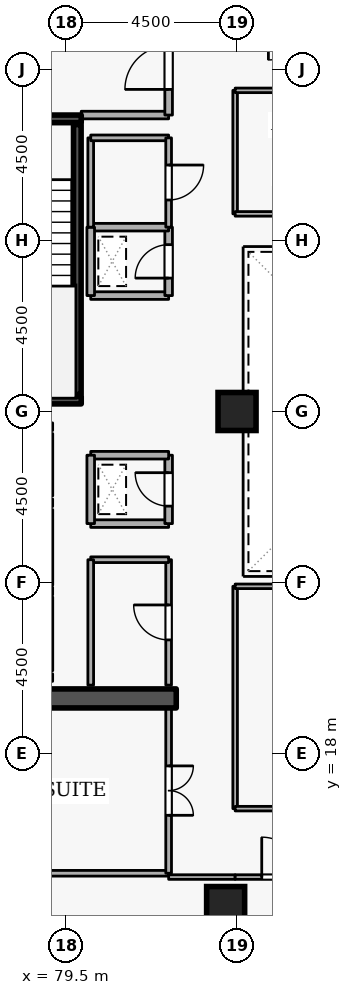
"""IFC4 building model, lengths in metres.
Left out: names, types, materials, properties, quantities, classifications, styles, units other than length and angle.
Written with IfcOpenShell. Run it as: python <this file> out.ifc"""

import sys

from ifc_helpers import new_model, si_unit, direction, frame, frame_2d, origin, origin_2d, place, context, subcontext, project, spatial, rectangle, extrude, element, fill, save


model = new_model("IFC4")
c1 = context("Model", 3, precision=1e-05, world=origin(), true_north=direction((0.0, 1.0)))
c2 = subcontext(c1, "Body", "Model", "MODEL_VIEW")
j1 = project(units=[si_unit("LENGTHUNIT", "METRE"), si_unit("PLANEANGLEUNIT", "RADIAN")], contexts=[c1])
p1 = place(None, origin())
s1 = spatial("IfcSite", under=j1, at=p1, CompositionType="ELEMENT")
p2 = place(p1, origin())
s2 = spatial("IfcBuilding", under=s1, at=p2, CompositionType="ELEMENT")
p3 = place(p2, frame((0.0, 0.0, 233.1)))
s3 = spatial("IfcBuildingStorey", under=s2, at=p3, CompositionType="ELEMENT", Elevation=233.1)
p4 = place(p3, frame((76.6, 19.45, 0.0), z_axis=(0.0, 0.0, 1.0), x_axis=(1.0, 0.0, 0.0)))
e1 = element("IfcWall", 1, at=p4, inside=s3, PredefinedType="SHEAR", context=c2, shape_type="SweptSolid", body=[
    extrude(rectangle(XDim=5.8, YDim=0.5, at=frame_2d((2.9, 0.0))), origin(), (0.0, 0.0, 1.0), 3.6),
])
for number, where, z_axis, x_axis in (
    (2, (83.7, 14.0, 0.0), (0.0, 0.0, 1.0), (1.0, 0.0, 0.0)),
    (3, (84.0, 27.0, 0.0), (0.0, 0.0, 1.0), (1.0, 0.0, 0.0)),
):
    element("IfcColumn", number, at=place(p3, frame(where, z_axis=z_axis, x_axis=x_axis)), inside=s3, PredefinedType="COLUMN", context=c2, shape_type="SweptSolid", body=[
        extrude(rectangle(XDim=1.0, YDim=1.0, at=origin_2d()), origin(), (0.0, 0.0, 1.0), 3.6),
    ])
p5 = place(p3, frame((79.05, 24.78, 0.0), z_axis=(0.0, 0.0, 1.0), x_axis=(0.0, 1.0, 0.0)))
e4 = element("IfcWall", 4, at=p5, inside=s3, PredefinedType="STANDARD", context=c2, shape_type="SweptSolid", body=[
    extrude(rectangle(XDim=1.64, YDim=0.2, at=frame_2d((0.82, 0.0))), origin(), (0.0, 0.0, 1.0), 3.34),
])
p6 = place(p5, frame((0.31, 0.0, 0.0)))
e5 = element("IfcOpeningElement", 5, at=p6, cuts=e4, PredefinedType="OPENING", context=c2, shape_type="SweptSolid", body=[
    extrude(rectangle(XDim=1.02, YDim=2.06, at=frame_2d((0.51, 1.03))), frame((0.0, 0.11, 0.0), z_axis=(0.0, -1.0, 0.0), x_axis=(1.0, 0.0, 0.0)), (0.0, 0.0, 1.0), 0.22),
])
p7 = place(p3, frame((79.05, 22.43, 0.0), z_axis=(0.0, 0.0, 1.0), x_axis=(0.0, 1.0, 0.0)))
e6 = element("IfcWall", 6, at=p7, inside=s3, PredefinedType="STANDARD", context=c2, shape_type="SweptSolid", body=[
    extrude(rectangle(XDim=1.99, YDim=0.2, at=frame_2d((0.995, 0.0))), origin(), (0.0, 0.0, 1.0), 3.34),
])
p8 = place(p7, frame((0.485, 0.0, 0.0)))
e7 = element("IfcOpeningElement", 7, at=p8, cuts=e6, PredefinedType="OPENING", context=c2, shape_type="SweptSolid", body=[
    extrude(rectangle(XDim=1.02, YDim=2.06, at=frame_2d((0.51, 1.03))), frame((0.0, 0.11, 0.0), z_axis=(0.0, -1.0, 0.0), x_axis=(1.0, 0.0, 0.0)), (0.0, 0.0, 1.0), 0.22),
])
p9 = place(p3, frame((79.05, 20.18, 0.0), z_axis=(0.0, 0.0, 1.0), x_axis=(0.0, 1.0, 0.0)))
e8 = element("IfcWall", 8, at=p9, inside=s3, PredefinedType="STANDARD", context=c2, shape_type="SweptSolid", body=[
    extrude(rectangle(XDim=1.94, YDim=0.2, at=frame_2d((0.97, 0.0))), origin(), (0.0, 0.0, 1.0), 3.34),
])
p10 = place(p9, frame((0.46, 0.0, 0.0)))
e9 = element("IfcOpeningElement", 9, at=p10, cuts=e8, PredefinedType="OPENING", context=c2, shape_type="SweptSolid", body=[
    extrude(rectangle(XDim=1.02, YDim=2.06, at=frame_2d((0.51, 1.03))), frame((0.0, 0.11, 0.0), z_axis=(0.0, -1.0, 0.0), x_axis=(1.0, 0.0, 0.0)), (0.0, 0.0, 1.0), 0.22),
])
p11 = place(p3, frame((76.55, 34.7, 0.0), z_axis=(0.0, 0.0, 1.0), x_axis=(1.0, 0.0, 0.0)))
e10 = element("IfcWall", 10, at=p11, inside=s3, PredefinedType="SHEAR", context=c2, shape_type="SweptSolid", body=[
    extrude(rectangle(XDim=3.35, YDim=0.2, at=frame_2d((1.675, 0.0))), origin(), (0.0, 0.0, 1.0), 3.6),
])
p12 = place(p11, frame((1.125, 0.0, 0.0)))
e11 = element("IfcOpeningElement", 11, at=p12, cuts=e10, PredefinedType="OPENING", context=c2, shape_type="SweptSolid", body=[
    extrude(rectangle(XDim=1.1, YDim=2.1, at=frame_2d((0.55, 1.05))), frame((0.0, 0.11, 0.0), z_axis=(0.0, -1.0, 0.0), x_axis=(1.0, 0.0, 0.0)), (0.0, 0.0, 1.0), 0.22),
])
p13 = place(p3, frame((79.9, 27.3, 0.0), z_axis=(0.0, 0.0, 1.0), x_axis=(-1.0, 0.0, 0.0)))
e12 = element("IfcWall", 12, at=p13, inside=s3, PredefinedType="SHEAR", context=c2, shape_type="SweptSolid", body=[
    extrude(rectangle(XDim=3.35, YDim=0.2, at=frame_2d((1.675, 0.0))), origin(), (0.0, 0.0, 1.0), 3.6),
])
p14 = place(p3, frame((79.797, 27.45, 0.0), z_axis=(0.0, 0.0, 1.0), x_axis=(0.0, 1.0, 0.0)))
e13 = element("IfcWall", 13, at=p14, inside=s3, PredefinedType="SHEAR", context=c2, shape_type="SweptSolid", body=[
    extrude(rectangle(XDim=7.1, YDim=0.2, at=frame_2d((3.55, 0.0))), origin(), (0.0, 0.0, 1.0), 3.6),
])
p15 = place(p3, frame((79.9, 34.8, 0.0), z_axis=(0.0, 0.0, 1.0), x_axis=(1.0, 0.0, 0.0)))
e14 = element("IfcWall", 14, at=p15, inside=s3, PredefinedType="STANDARD", context=c2, shape_type="SweptSolid", body=[
    extrude(rectangle(XDim=2.3, YDim=0.2, at=frame_2d((1.15, 0.0))), origin(), (0.0, 0.0, 1.0), 2.545),
])
p16 = place(p3, frame((82.2, 34.8, 0.0), z_axis=(0.0, 0.0, 1.0), x_axis=(0.0, 1.0, 0.0)))
e15 = element("IfcWall", 15, at=p16, inside=s3, PredefinedType="STANDARD", context=c2, shape_type="SweptSolid", body=[
    extrude(rectangle(XDim=2.5, YDim=0.2, at=frame_2d((1.25, 0.0))), origin(), (0.0, 0.0, 1.0), 3.34),
])
p17 = place(p16, frame((0.675, 0.0, 0.0)))
e16 = element("IfcOpeningElement", 16, at=p17, cuts=e15, PredefinedType="OPENING", context=c2, shape_type="SweptSolid", body=[
    extrude(rectangle(XDim=1.15, YDim=2.1, at=frame_2d((0.575, 1.05))), frame((0.0, 0.11, 0.0), z_axis=(0.0, -1.0, 0.0), x_axis=(1.0, 0.0, 0.0)), (0.0, 0.0, 1.0), 0.22),
])
p18 = place(p3, frame((80.15, 24.05, 0.0), z_axis=(0.0, 0.0, 1.0), x_axis=(1.0, 0.0, 0.0)))
e17 = element("IfcWall", 17, at=p18, inside=s3, PredefinedType="STANDARD", context=c2, shape_type="SweptSolid", body=[
    extrude(rectangle(XDim=2.05, YDim=0.2, at=frame_2d((1.025, 0.0))), origin(), (0.0, 0.0, 1.0), 3.34),
])
p19 = place(p3, frame((82.2, 24.05, 0.0), z_axis=(0.0, 0.0, 1.0), x_axis=(0.0, 1.0, 0.0)))
e18 = element("IfcWall", 18, at=p19, inside=s3, PredefinedType="STANDARD", context=c2, shape_type="SweptSolid", body=[
    extrude(rectangle(XDim=1.8, YDim=0.2, at=frame_2d((0.9, 0.0))), origin(), (0.0, 0.0, 1.0), 3.34),
])
p20 = place(p19, frame((0.46, 0.0, 0.0)))
e19 = element("IfcOpeningElement", 19, at=p20, cuts=e18, PredefinedType="OPENING", context=c2, shape_type="SweptSolid", body=[
    extrude(rectangle(XDim=0.88, YDim=2.04, at=frame_2d((0.44, 1.02))), frame((0.0, 0.11, 0.0), z_axis=(0.0, -1.0, 0.0), x_axis=(1.0, 0.0, 0.0)), (0.0, 0.0, 1.0), 0.22),
])
p21 = place(p3, frame((82.2, 25.85, 0.0), z_axis=(0.0, 0.0, 1.0), x_axis=(-1.0, 0.0, 0.0)))
e20 = element("IfcWall", 20, at=p21, inside=s3, PredefinedType="STANDARD", context=c2, shape_type="SweptSolid", body=[
    extrude(rectangle(XDim=2.05, YDim=0.2, at=frame_2d((1.025, 0.0))), origin(), (0.0, 0.0, 1.0), 3.34),
])
p22 = place(p3, frame((80.15, 25.85, 0.0), z_axis=(0.0, 0.0, 1.0), x_axis=(0.0, -1.0, 0.0)))
e21 = element("IfcWall", 21, at=p22, inside=s3, PredefinedType="STANDARD", context=c2, shape_type="SweptSolid", body=[
    extrude(rectangle(XDim=1.8, YDim=0.2, at=frame_2d((0.9, 0.0))), origin(), (0.0, 0.0, 1.0), 3.34),
])
p23 = place(p3, frame((80.15, 30.05, 0.0), z_axis=(0.0, 0.0, 1.0), x_axis=(1.0, 0.0, 0.0)))
e22 = element("IfcWall", 22, at=p23, inside=s3, PredefinedType="STANDARD", context=c2, shape_type="SweptSolid", body=[
    extrude(rectangle(XDim=2.05, YDim=0.2, at=frame_2d((1.025, 0.0))), origin(), (0.0, 0.0, 1.0), 3.34),
])
p24 = place(p3, frame((82.2, 30.05, 0.0), z_axis=(0.0, 0.0, 1.0), x_axis=(0.0, 1.0, 0.0)))
e23 = element("IfcWall", 23, at=p24, inside=s3, PredefinedType="STANDARD", context=c2, shape_type="SweptSolid", body=[
    extrude(rectangle(XDim=1.8, YDim=0.2, at=frame_2d((0.9, 0.0))), origin(), (0.0, 0.0, 1.0), 3.34),
])
p25 = place(p24, frame((0.46, 0.0, 0.0)))
e24 = element("IfcOpeningElement", 24, at=p25, cuts=e23, PredefinedType="OPENING", context=c2, shape_type="SweptSolid", body=[
    extrude(rectangle(XDim=0.88, YDim=2.04, at=frame_2d((0.44, 1.02))), frame((0.0, 0.11, 0.0), z_axis=(0.0, -1.0, 0.0), x_axis=(1.0, 0.0, 0.0)), (0.0, 0.0, 1.0), 0.22),
])
p26 = place(p3, frame((82.2, 31.85, 0.0), z_axis=(0.0, 0.0, 1.0), x_axis=(-1.0, 0.0, 0.0)))
e25 = element("IfcWall", 25, at=p26, inside=s3, PredefinedType="STANDARD", context=c2, shape_type="SweptSolid", body=[
    extrude(rectangle(XDim=2.05, YDim=0.2, at=frame_2d((1.025, 0.0))), origin(), (0.0, 0.0, 1.0), 3.34),
])
p27 = place(p3, frame((80.15, 31.85, 0.0), z_axis=(0.0, 0.0, 1.0), x_axis=(0.0, -1.0, 0.0)))
e26 = element("IfcWall", 26, at=p27, inside=s3, PredefinedType="STANDARD", context=c2, shape_type="SweptSolid", body=[
    extrude(rectangle(XDim=1.8, YDim=0.2, at=frame_2d((0.9, 0.0))), origin(), (0.0, 0.0, 1.0), 3.34),
])
p28 = place(p3, frame((82.2, 19.8, 0.0), z_axis=(0.0, 0.0, 1.0), x_axis=(0.0, 1.0, 0.0)))
e27 = element("IfcWall", 27, at=p28, inside=s3, PredefinedType="PARTITIONING", context=c2, shape_type="SweptSolid", body=[
    extrude(rectangle(XDim=3.3, YDim=0.15, at=frame_2d((1.65, 0.0))), origin(), (0.0, 0.0, 1.0), 3.34),
])
p29 = place(p28, frame((1.19, 0.0, 0.0)))
e28 = element("IfcOpeningElement", 28, at=p29, cuts=e27, PredefinedType="OPENING", context=c2, shape_type="SweptSolid", body=[
    extrude(rectangle(XDim=0.92, YDim=2.08, at=frame_2d((0.46, 1.04))), frame((0.0, 0.085, 0.0), z_axis=(0.0, -1.0, 0.0), x_axis=(1.0, 0.0, 0.0)), (0.0, 0.0, 1.0), 0.17),
])
p30 = place(p3, frame((82.2, 23.1, 0.0), z_axis=(0.0, 0.0, 1.0), x_axis=(-1.0, 0.0, 0.0)))
e29 = element("IfcWall", 29, at=p30, inside=s3, PredefinedType="PARTITIONING", context=c2, shape_type="SweptSolid", body=[
    extrude(rectangle(XDim=2.05, YDim=0.15, at=frame_2d((1.025, 0.0))), origin(), (0.0, 0.0, 1.0), 3.34),
])
p31 = place(p3, frame((80.15, 23.1, 0.0), z_axis=(0.0, 0.0, 1.0), x_axis=(0.0, -1.0, 0.0)))
e30 = element("IfcWall", 30, at=p31, inside=s3, PredefinedType="PARTITIONING", context=c2, shape_type="SweptSolid", body=[
    extrude(rectangle(XDim=3.3, YDim=0.15, at=frame_2d((1.65, 0.0))), origin(), (0.0, 0.0, 1.0), 3.34),
])
p32 = place(p3, frame((80.15, 31.85, 0.0), z_axis=(0.0, 0.0, 1.0), x_axis=(0.0, 1.0, 0.0)))
e31 = element("IfcWall", 31, at=p32, inside=s3, PredefinedType="PARTITIONING", context=c2, shape_type="SweptSolid", body=[
    extrude(rectangle(XDim=2.35, YDim=0.15, at=frame_2d((1.175, 0.0))), origin(), (0.0, 0.0, 1.0), 3.34),
])
p33 = place(p3, frame((80.15, 34.2, 0.0), z_axis=(0.0, 0.0, 1.0), x_axis=(1.0, 0.0, 0.0)))
e32 = element("IfcWall", 32, at=p33, inside=s3, PredefinedType="PARTITIONING", context=c2, shape_type="SweptSolid", body=[
    extrude(rectangle(XDim=2.05, YDim=0.15, at=frame_2d((1.025, 0.0))), origin(), (0.0, 0.0, 1.0), 2.545),
])
p34 = place(p3, frame((82.2, 34.2, 0.0), z_axis=(0.0, 0.0, 1.0), x_axis=(0.0, -1.0, 0.0)))
e33 = element("IfcWall", 33, at=p34, inside=s3, PredefinedType="PARTITIONING", context=c2, shape_type="SweptSolid", body=[
    extrude(rectangle(XDim=2.35, YDim=0.15, at=frame_2d((1.175, 0.0))), origin(), (0.0, 0.0, 1.0), 3.34),
])
p35 = place(p34, frame((0.715, 0.0, 0.0)))
e34 = element("IfcOpeningElement", 34, at=p35, cuts=e33, PredefinedType="OPENING", context=c2, shape_type="SweptSolid", body=[
    extrude(rectangle(XDim=0.92, YDim=2.08, at=frame_2d((0.46, 1.04))), frame((0.0, 0.085, 0.0), z_axis=(0.0, -1.0, 0.0), x_axis=(1.0, 0.0, 0.0)), (0.0, 0.0, 1.0), 0.17),
])
p36 = place(p3, frame((82.2, 14.85, 0.0), z_axis=(0.0, 0.0, 1.0), x_axis=(-1.0, 0.0, 0.0)))
e35 = element("IfcWall", 35, at=p36, inside=s3, PredefinedType="PARTITIONING", context=c2, shape_type="SweptSolid", body=[
    extrude(rectangle(XDim=11.42, YDim=0.15, at=frame_2d((5.71, 0.0))), origin(), (0.0, 0.0, 1.0), 3.34),
])
p37 = place(p3, frame((82.2, 19.2, 0.0), z_axis=(0.0, 0.0, 1.0), x_axis=(0.0, -1.0, 0.0)))
e36 = element("IfcWall", 36, at=p37, inside=s3, PredefinedType="PARTITIONING", context=c2, shape_type="SweptSolid", body=[
    extrude(rectangle(XDim=4.35, YDim=0.15, at=frame_2d((2.175, 0.0))), origin(), (0.0, 0.0, 1.0), 3.34),
])
p38 = place(p37, frame((1.525, 0.0, 0.0)))
e37 = element("IfcOpeningElement", 37, at=p38, cuts=e36, PredefinedType="OPENING", context=c2, shape_type="SweptSolid", body=[
    extrude(rectangle(XDim=1.3, YDim=2.12, at=frame_2d((0.65, 1.06))), frame((0.0, 0.085, 0.0), z_axis=(0.0, -1.0, 0.0), x_axis=(1.0, 0.0, 0.0)), (0.0, 0.0, 1.0), 0.17),
])
p39 = place(p3, frame((82.2, 14.75, 0.0), z_axis=(0.0, 0.0, 1.0), x_axis=(1.0, 0.0, 0.0)))
e38 = element("IfcWall", 38, at=p39, inside=s3, PredefinedType="PARTITIONING", context=c2, shape_type="SweptSolid", body=[
    extrude(rectangle(XDim=1.75, YDim=0.12, at=frame_2d((0.875, 0.0))), origin(), (0.0, 0.0, 1.0), 3.34),
])
p40 = place(p3, frame((83.95, 14.75, 0.0), z_axis=(0.0, 0.0, 1.0), x_axis=(1.0, 0.0, 0.0)))
e39 = element("IfcWall", 39, at=p40, inside=s3, PredefinedType="PARTITIONING", context=c2, shape_type="SweptSolid", body=[
    extrude(rectangle(XDim=2.45, YDim=0.12, at=frame_2d((1.225, 0.0))), origin(), (0.0, 0.0, 1.0), 3.34),
])
p41 = place(p40, frame((0.7, 0.0, 0.0)))
e40 = element("IfcOpeningElement", 40, at=p41, cuts=e39, PredefinedType="OPENING", context=c2, shape_type="SweptSolid", body=[
    extrude(rectangle(XDim=1.05, YDim=2.1, at=frame_2d((0.525, 1.05))), frame((0.0, 0.07, 0.0), z_axis=(0.0, -1.0, 0.0), x_axis=(1.0, 0.0, 0.0)), (0.0, 0.0, 1.0), 0.14),
])
p42 = place(p3, frame((83.95, 16.55, 0.0), z_axis=(0.0, 0.0, 1.0), x_axis=(0.0, 1.0, 0.0)))
e41 = element("IfcWall", 41, at=p42, inside=s3, PredefinedType="PARTITIONING", context=c2, shape_type="SweptSolid", body=[
    extrude(rectangle(XDim=5.85, YDim=0.12, at=frame_2d((2.925, 0.0))), origin(), (0.0, 0.0, 1.0), 3.34),
])
p43 = place(p3, frame((83.95, 22.4, 0.0), z_axis=(0.0, 0.0, 1.0), x_axis=(1.0, 0.0, 0.0)))
e42 = element("IfcWall", 42, at=p43, inside=s3, PredefinedType="PARTITIONING", context=c2, shape_type="SweptSolid", body=[
    extrude(rectangle(XDim=9.1, YDim=0.12, at=frame_2d((4.55, 0.0))), origin(), (0.0, 0.0, 1.0), 3.34),
])
p44 = place(p3, frame((93.05, 16.55, 0.0), z_axis=(0.0, 0.0, 1.0), x_axis=(-1.0, 0.0, 0.0)))
e43 = element("IfcWall", 43, at=p44, inside=s3, PredefinedType="PARTITIONING", context=c2, shape_type="SweptSolid", body=[
    extrude(rectangle(XDim=9.1, YDim=0.12, at=frame_2d((4.55, 0.0))), origin(), (0.0, 0.0, 1.0), 3.34),
])
p45 = place(p44, frame((4.075, 0.0, 0.0)))
e44 = element("IfcOpeningElement", 44, at=p45, cuts=e43, PredefinedType="OPENING", context=c2, shape_type="SweptSolid", body=[
    extrude(rectangle(XDim=0.95, YDim=2.1, at=frame_2d((0.475, 1.05))), frame((0.0, 0.07, 0.0), z_axis=(0.0, -1.0, 0.0), x_axis=(1.0, 0.0, 0.0)), (0.0, 0.0, 1.0), 0.14),
])
p46 = place(p3, frame((83.95, 32.2, 0.0), z_axis=(0.0, 0.0, 1.0), x_axis=(0.0, 1.0, 0.0)))
e45 = element("IfcWall", 45, at=p46, inside=s3, PredefinedType="PARTITIONING", context=c2, shape_type="SweptSolid", body=[
    extrude(rectangle(XDim=3.25, YDim=0.12, at=frame_2d((1.625, 0.0))), origin(), (0.0, 0.0, 1.0), 3.34),
])
p47 = place(p3, frame((83.95, 35.45, 0.0), z_axis=(0.0, 0.0, 1.0), x_axis=(1.0, 0.0, 0.0)))
e46 = element("IfcWall", 46, at=p47, inside=s3, PredefinedType="PARTITIONING", context=c2, shape_type="SweptSolid", body=[
    extrude(rectangle(XDim=9.1, YDim=0.12, at=frame_2d((4.55, 0.0))), origin(), (0.0, 0.0, 1.0), 3.34),
])
p48 = place(p47, frame((4.075, 0.0, 0.0)))
e47 = element("IfcOpeningElement", 47, at=p48, cuts=e46, PredefinedType="OPENING", context=c2, shape_type="SweptSolid", body=[
    extrude(rectangle(XDim=0.95, YDim=2.1, at=frame_2d((0.475, 1.05))), frame((0.0, 0.07, 0.0), z_axis=(0.0, -1.0, 0.0), x_axis=(1.0, 0.0, 0.0)), (0.0, 0.0, 1.0), 0.14),
])
p49 = place(p3, frame((93.05, 32.2, 0.0), z_axis=(0.0, 0.0, 1.0), x_axis=(-1.0, 0.0, 0.0)))
e48 = element("IfcWall", 48, at=p49, inside=s3, PredefinedType="PARTITIONING", context=c2, shape_type="SweptSolid", body=[
    extrude(rectangle(XDim=9.1, YDim=0.12, at=frame_2d((4.55, 0.0))), origin(), (0.0, 0.0, 1.0), 3.34),
])
p50 = place(p17, origin())
e49 = element("IfcDoor", 49, at=p50, inside=s3, OperationType="SINGLE_SWING_LEFT", PredefinedType="DOOR", context=c2, shape_type="SweptSolid", body=[
    extrude(rectangle(XDim=1.15, YDim=2.1, at=frame_2d((0.575, 1.05))), frame((0.0, 0.025, 0.0), z_axis=(0.0, -1.0, 0.0), x_axis=(1.0, 0.0, 0.0)), (0.0, 0.0, 1.0), 0.05),
])
fill(e16, e49)
p51 = place(p20, origin())
e50 = element("IfcDoor", 50, at=p51, inside=s3, OperationType="SINGLE_SWING_RIGHT", PredefinedType="DOOR", context=c2, shape_type="SweptSolid", body=[
    extrude(rectangle(XDim=0.88, YDim=2.04, at=frame_2d((0.44, 1.02))), frame((0.0, 0.025, 0.0), z_axis=(0.0, -1.0, 0.0), x_axis=(1.0, 0.0, 0.0)), (0.0, 0.0, 1.0), 0.05),
])
fill(e19, e50)
p52 = place(p25, origin())
e51 = element("IfcDoor", 51, at=p52, inside=s3, OperationType="SINGLE_SWING_LEFT", PredefinedType="DOOR", context=c2, shape_type="SweptSolid", body=[
    extrude(rectangle(XDim=0.88, YDim=2.04, at=frame_2d((0.44, 1.02))), frame((0.0, 0.025, 0.0), z_axis=(0.0, -1.0, 0.0), x_axis=(1.0, 0.0, 0.0)), (0.0, 0.0, 1.0), 0.05),
])
fill(e24, e51)
p53 = place(p29, origin())
e52 = element("IfcDoor", 52, at=p53, inside=s3, OperationType="SINGLE_SWING_RIGHT", PredefinedType="DOOR", context=c2, shape_type="SweptSolid", body=[
    extrude(rectangle(XDim=0.92, YDim=2.08, at=frame_2d((0.46, 1.04))), frame((0.0, 0.025, 0.0), z_axis=(0.0, -1.0, 0.0), x_axis=(1.0, 0.0, 0.0)), (0.0, 0.0, 1.0), 0.05),
])
fill(e28, e52)
p54 = place(p35, origin())
e53 = element("IfcDoor", 53, at=p54, inside=s3, OperationType="SINGLE_SWING_LEFT", PredefinedType="DOOR", context=c2, shape_type="SweptSolid", body=[
    extrude(rectangle(XDim=0.92, YDim=2.08, at=frame_2d((0.46, 1.04))), frame((0.0, 0.025, 0.0), z_axis=(0.0, -1.0, 0.0), x_axis=(1.0, 0.0, 0.0)), (0.0, 0.0, 1.0), 0.05),
])
fill(e34, e53)
p55 = place(p38, origin())
e54 = element("IfcDoor", 54, at=p55, inside=s3, OperationType="DOUBLE_DOOR_SINGLE_SWING", PredefinedType="DOOR", context=c2, shape_type="SweptSolid", body=[
    extrude(rectangle(XDim=1.3, YDim=2.12, at=frame_2d((0.65, 1.06))), frame((0.0, 0.025, 0.0), z_axis=(0.0, -1.0, 0.0), x_axis=(1.0, 0.0, 0.0)), (0.0, 0.0, 1.0), 0.05),
])
fill(e37, e54)
p56 = place(p41, origin())
e55 = element("IfcDoor", 55, at=p56, inside=s3, OperationType="SINGLE_SWING_LEFT", PredefinedType="DOOR", context=c2, shape_type="SweptSolid", body=[
    extrude(rectangle(XDim=1.05, YDim=2.1, at=frame_2d((0.525, 1.05))), frame((0.0, 0.025, 0.0), z_axis=(0.0, -1.0, 0.0), x_axis=(1.0, 0.0, 0.0)), (0.0, 0.0, 1.0), 0.05),
])
fill(e40, e55)
save(model, sys.argv[1])
